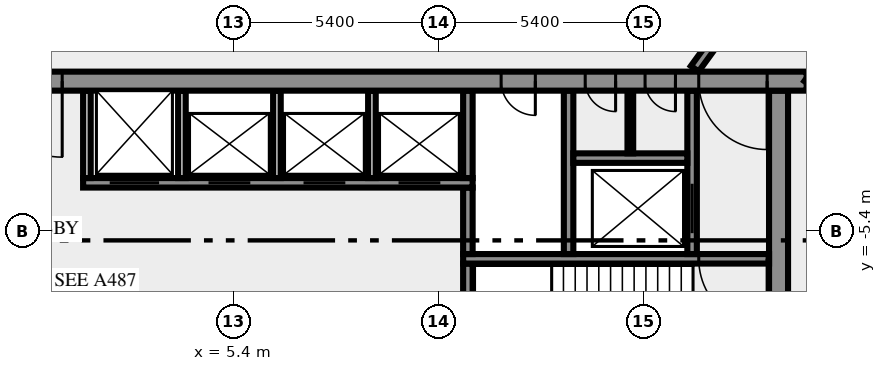
"""IFC4 building model, lengths in metres.
Left out: names, types, materials, properties, quantities, classifications, styles, units other than length and angle.
Written with IfcOpenShell. Run it as: python <this file> out.ifc"""

import sys

from ifc_helpers import new_model, si_unit, direction, frame, frame_2d, origin, place, context, subcontext, project, spatial, rectangle, extrude, element, fill, save


model = new_model("IFC4")
c1 = context("Model", 3, precision=1e-05, world=origin(), true_north=direction((0.0, 1.0)))
c2 = subcontext(c1, "Body", "Model", "MODEL_VIEW")
j1 = project(units=[si_unit("LENGTHUNIT", "METRE"), si_unit("PLANEANGLEUNIT", "RADIAN")], contexts=[c1])
p1 = place(None, origin())
s1 = spatial("IfcSite", under=j1, at=p1, CompositionType="ELEMENT")
p2 = place(p1, origin())
s2 = spatial("IfcBuilding", under=s1, at=p2, CompositionType="ELEMENT")
p3 = place(p2, frame((0.0, 0.0, 180.0)))
s3 = spatial("IfcBuildingStorey", under=s2, at=p3, CompositionType="ELEMENT", Elevation=180.0)
p4 = place(p3, frame((19.75, -10.5, 0.0), z_axis=(0.0, 0.0, 1.0), x_axis=(0.0, 1.0, 0.0)))
e1 = element("IfcWall", 1, at=p4, inside=s3, PredefinedType="SHEAR", context=c2, shape_type="SweptSolid", body=[
    extrude(rectangle(XDim=8.8, YDim=0.5, at=frame_2d((4.4, 0.0))), origin(), (0.0, 0.0, 1.0), 3.65),
])
p5 = place(p3, frame((11.575, -7.25, 0.0), z_axis=(0.0, 0.0, 1.0), x_axis=(0.0, 1.0, 0.0)))
e2 = element("IfcWall", 2, at=p5, inside=s3, PredefinedType="SHEAR", context=c2, shape_type="SweptSolid", body=[
    extrude(rectangle(XDim=1.0, YDim=0.25, at=frame_2d((0.5, 0.0))), origin(), (0.0, 0.0, 1.0), 3.65),
])
p6 = place(p3, frame((19.5, -6.125, 0.0), z_axis=(0.0, 0.0, 1.0), x_axis=(-1.0, 0.0, 0.0)))
e3 = element("IfcWall", 3, at=p6, inside=s3, PredefinedType="SHEAR", context=c2, shape_type="SweptSolid", body=[
    extrude(rectangle(XDim=8.05, YDim=0.25, at=frame_2d((4.025, 0.0))), origin(), (0.0, 0.0, 1.0), 3.65),
])
p7 = place(p6, frame((0.05, 0.0, 0.0)))
e4 = element("IfcOpeningElement", 4, at=p7, cuts=e3, PredefinedType="OPENING", context=c2, shape_type="SweptSolid", body=[
    extrude(rectangle(XDim=1.8, YDim=2.1, at=frame_2d((0.9, 1.05))), frame((0.0, 0.135, 0.0), z_axis=(0.0, -1.0, 0.0), x_axis=(1.0, 0.0, 0.0)), (0.0, 0.0, 1.0), 0.27),
])
p8 = place(p3, frame((11.575, -6.0, 0.0), z_axis=(0.0, 0.0, 1.0), x_axis=(0.0, 1.0, 0.0)))
e5 = element("IfcWall", 5, at=p8, inside=s3, PredefinedType="SHEAR", context=c2, shape_type="SweptSolid", body=[
    extrude(rectangle(XDim=1.75, YDim=0.25, at=frame_2d((0.875, 0.0))), origin(), (0.0, 0.0, 1.0), 3.65),
])
p9 = place(p3, frame((14.225, -6.0, 0.0), z_axis=(0.0, 0.0, 1.0), x_axis=(0.0, 1.0, 0.0)))
e6 = element("IfcWall", 6, at=p9, inside=s3, PredefinedType="SHEAR", context=c2, shape_type="SweptSolid", body=[
    extrude(rectangle(XDim=4.3, YDim=0.25, at=frame_2d((2.15, 0.0))), origin(), (0.0, 0.0, 1.0), 3.65),
])
p10 = place(p3, frame((17.475, -6.0, 0.0), z_axis=(0.0, 0.0, 1.0), x_axis=(0.0, 1.0, 0.0)))
e7 = element("IfcWall", 7, at=p10, inside=s3, PredefinedType="SHEAR", context=c2, shape_type="SweptSolid", body=[
    extrude(rectangle(XDim=4.3, YDim=0.25, at=frame_2d((2.15, 0.0))), origin(), (0.0, 0.0, 1.0), 3.65),
])
p11 = place(p10, frame((0.55, 0.0, 0.0)))
e8 = element("IfcOpeningElement", 8, at=p11, cuts=e7, PredefinedType="OPENING", context=c2, shape_type="SweptSolid", body=[
    extrude(rectangle(XDim=1.3, YDim=2.1, at=frame_2d((0.65, 1.05))), frame((0.0, 0.135, 0.0), z_axis=(0.0, -1.0, 0.0), x_axis=(1.0, 0.0, 0.0)), (0.0, 0.0, 1.0), 0.27),
])
p12 = place(p3, frame((1.45, -4.125, 0.0), z_axis=(0.0, 0.0, 1.0), x_axis=(1.0, 0.0, 0.0)))
e9 = element("IfcWall", 9, at=p12, inside=s3, PredefinedType="SHEAR", context=c2, shape_type="SweptSolid", body=[
    extrude(rectangle(XDim=10.25, YDim=0.25, at=frame_2d((5.125, 0.0))), origin(), (0.0, 0.0, 1.0), 3.65),
])
p13 = place(p12, frame((0.7, 0.0, 0.0)))
e10 = element("IfcOpeningElement", 10, at=p13, cuts=e9, PredefinedType="OPENING", context=c2, shape_type="SweptSolid", body=[
    extrude(rectangle(XDim=1.3, YDim=2.1, at=frame_2d((0.65, 1.05))), frame((0.0, 0.135, 0.0), z_axis=(0.0, -1.0, 0.0), x_axis=(1.0, 0.0, 0.0)), (0.0, 0.0, 1.0), 0.27),
])
p14 = place(p12, frame((3.3, 0.0, 0.0)))
e11 = element("IfcOpeningElement", 11, at=p14, cuts=e9, PredefinedType="OPENING", context=c2, shape_type="SweptSolid", body=[
    extrude(rectangle(XDim=1.1, YDim=2.1, at=frame_2d((0.55, 1.05))), frame((0.0, 0.135, 0.0), z_axis=(0.0, -1.0, 0.0), x_axis=(1.0, 0.0, 0.0)), (0.0, 0.0, 1.0), 0.27),
])
p15 = place(p12, frame((5.8, 0.0, 0.0)))
e12 = element("IfcOpeningElement", 12, at=p15, cuts=e9, PredefinedType="OPENING", context=c2, shape_type="SweptSolid", body=[
    extrude(rectangle(XDim=1.1, YDim=2.1, at=frame_2d((0.55, 1.05))), frame((0.0, 0.135, 0.0), z_axis=(0.0, -1.0, 0.0), x_axis=(1.0, 0.0, 0.0)), (0.0, 0.0, 1.0), 0.27),
])
p16 = place(p12, frame((8.3, 0.0, 0.0)))
e13 = element("IfcOpeningElement", 13, at=p16, cuts=e9, PredefinedType="OPENING", context=c2, shape_type="SweptSolid", body=[
    extrude(rectangle(XDim=1.1, YDim=2.1, at=frame_2d((0.55, 1.05))), frame((0.0, 0.135, 0.0), z_axis=(0.0, -1.0, 0.0), x_axis=(1.0, 0.0, 0.0)), (0.0, 0.0, 1.0), 0.27),
])
for number, where, z_axis, x_axis in (
    (14, (1.55, -4.0, 0.0), (0.0, 0.0, 1.0), (0.0, 1.0, 0.0)),
    (15, (4.05, -4.0, 0.0), (0.0, 0.0, 1.0), (0.0, 1.0, 0.0)),
    (16, (6.55, -4.0, 0.0), (0.0, 0.0, 1.0), (0.0, 1.0, 0.0)),
    (17, (9.05, -4.0, 0.0), (0.0, 0.0, 1.0), (0.0, 1.0, 0.0)),
):
    element("IfcWall", number, at=place(p3, frame(where, z_axis=z_axis, x_axis=x_axis)), inside=s3, PredefinedType="SOLIDWALL", context=c2, shape_type="SweptSolid", body=[
        extrude(rectangle(XDim=2.3, YDim=0.2, at=frame_2d((1.15, 0.0))), origin(), (0.0, 0.0, 1.0), 3.65),
    ])
p17 = place(p3, frame((11.575, -4.0, 0.0), z_axis=(0.0, 0.0, 1.0), x_axis=(0.0, 1.0, 0.0)))
e18 = element("IfcWall", 18, at=p17, inside=s3, PredefinedType="SHEAR", context=c2, shape_type="SweptSolid", body=[
    extrude(rectangle(XDim=2.3, YDim=0.25, at=frame_2d((1.15, 0.0))), origin(), (0.0, 0.0, 1.0), 3.65),
])
p18 = place(p3, frame((14.35, -3.475, 0.0), z_axis=(0.0, 0.0, 1.0), x_axis=(1.0, 0.0, 0.0)))
e19 = element("IfcWall", 19, at=p18, inside=s3, PredefinedType="SHEAR", context=c2, shape_type="SweptSolid", body=[
    extrude(rectangle(XDim=3.0, YDim=0.25, at=frame_2d((1.5, 0.0))), origin(), (0.0, 0.0, 1.0), 3.65),
])
p19 = place(p3, frame((15.85, -3.35, 0.0), z_axis=(0.0, 0.0, 1.0), x_axis=(0.0, 1.0, 0.0)))
e20 = element("IfcWall", 20, at=p19, inside=s3, PredefinedType="PARTITIONING", context=c2, shape_type="SweptSolid", body=[
    extrude(rectangle(XDim=1.65, YDim=0.15, at=frame_2d((0.825, 0.0))), origin(), (0.0, 0.0, 1.0), 3.65),
])
p20 = place(p3, frame((20.49, -1.45, 0.0), z_axis=(0.0, 0.0, 1.0), x_axis=(-1.0, 0.0, 0.0)))
e21 = element("IfcWall", 21, at=p20, inside=s3, PredefinedType="SHEAR", context=c2, shape_type="SweptSolid", body=[
    extrude(rectangle(XDim=40.98, YDim=0.5, at=frame_2d((20.49, 0.0))), origin(), (0.0, 0.0, 1.0), 3.65),
])
p21 = place(p20, frame((38.14, 0.0, 0.0)))
e22 = element("IfcOpeningElement", 22, at=p21, cuts=e21, PredefinedType="OPENING", context=c2, shape_type="SweptSolid", body=[
    extrude(rectangle(XDim=1.8, YDim=2.1, at=frame_2d((0.9, 1.05))), frame((0.0, 0.26, 0.0), z_axis=(0.0, -1.0, 0.0), x_axis=(1.0, 0.0, 0.0)), (0.0, 0.0, 1.0), 0.52),
])
p22 = place(p20, frame((35.89, 0.0, 0.0)))
e23 = element("IfcOpeningElement", 23, at=p22, cuts=e21, PredefinedType="OPENING", context=c2, shape_type="SweptSolid", body=[
    extrude(rectangle(XDim=0.9, YDim=2.1, at=frame_2d((0.45, 1.05))), frame((0.0, 0.26, 0.0), z_axis=(0.0, -1.0, 0.0), x_axis=(1.0, 0.0, 0.0)), (0.0, 0.0, 1.0), 0.52),
])
p23 = place(p20, frame((32.94, 0.0, 0.0)))
e24 = element("IfcOpeningElement", 24, at=p23, cuts=e21, PredefinedType="OPENING", context=c2, shape_type="SweptSolid", body=[
    extrude(rectangle(XDim=0.9, YDim=2.1, at=frame_2d((0.45, 1.05))), frame((0.0, 0.26, 0.0), z_axis=(0.0, -1.0, 0.0), x_axis=(1.0, 0.0, 0.0)), (0.0, 0.0, 1.0), 0.52),
])
p24 = place(p20, frame((30.802, 0.0, 0.0)))
e25 = element("IfcOpeningElement", 25, at=p24, cuts=e21, PredefinedType="OPENING", context=c2, shape_type="SweptSolid", body=[
    extrude(rectangle(XDim=0.9, YDim=2.1, at=frame_2d((0.45, 1.05))), frame((0.0, 0.26, 0.0), z_axis=(0.0, -1.0, 0.0), x_axis=(1.0, 0.0, 0.0)), (0.0, 0.0, 1.0), 0.52),
])
p25 = place(p20, frame((29.24, 0.0, 0.0)))
e26 = element("IfcOpeningElement", 26, at=p25, cuts=e21, PredefinedType="OPENING", context=c2, shape_type="SweptSolid", body=[
    extrude(rectangle(XDim=0.9, YDim=2.1, at=frame_2d((0.45, 1.05))), frame((0.0, 0.26, 0.0), z_axis=(0.0, -1.0, 0.0), x_axis=(1.0, 0.0, 0.0)), (0.0, 0.0, 1.0), 0.52),
])
p26 = place(p20, frame((27.39, 0.0, 0.0)))
e27 = element("IfcOpeningElement", 27, at=p26, cuts=e21, PredefinedType="OPENING", context=c2, shape_type="SweptSolid", body=[
    extrude(rectangle(XDim=0.9, YDim=2.1, at=frame_2d((0.45, 1.05))), frame((0.0, 0.26, 0.0), z_axis=(0.0, -1.0, 0.0), x_axis=(1.0, 0.0, 0.0)), (0.0, 0.0, 1.0), 0.52),
])
p27 = place(p20, frame((25.228, 0.0, 0.0)))
e28 = element("IfcOpeningElement", 28, at=p27, cuts=e21, PredefinedType="OPENING", context=c2, shape_type="SweptSolid", body=[
    extrude(rectangle(XDim=0.9, YDim=2.1, at=frame_2d((0.45, 1.05))), frame((0.0, 0.26, 0.0), z_axis=(0.0, -1.0, 0.0), x_axis=(1.0, 0.0, 0.0)), (0.0, 0.0, 1.0), 0.52),
])
p28 = place(p20, frame((19.59, 0.0, 0.0)))
e29 = element("IfcOpeningElement", 29, at=p28, cuts=e21, PredefinedType="OPENING", context=c2, shape_type="SweptSolid", body=[
    extrude(rectangle(XDim=2.0, YDim=2.1, at=frame_2d((1.0, 1.05))), frame((0.0, 0.26, 0.0), z_axis=(0.0, -1.0, 0.0), x_axis=(1.0, 0.0, 0.0)), (0.0, 0.0, 1.0), 0.52),
])
p29 = place(p20, frame((7.14, 0.0, 0.0)))
e30 = element("IfcOpeningElement", 30, at=p29, cuts=e21, PredefinedType="OPENING", context=c2, shape_type="SweptSolid", body=[
    extrude(rectangle(XDim=0.9, YDim=2.1, at=frame_2d((0.45, 1.05))), frame((0.0, 0.26, 0.0), z_axis=(0.0, -1.0, 0.0), x_axis=(1.0, 0.0, 0.0)), (0.0, 0.0, 1.0), 0.52),
])
p30 = place(p20, frame((5.028, 0.0, 0.0)))
e31 = element("IfcOpeningElement", 31, at=p30, cuts=e21, PredefinedType="OPENING", context=c2, shape_type="SweptSolid", body=[
    extrude(rectangle(XDim=0.8, YDim=2.1, at=frame_2d((0.4, 1.05))), frame((0.0, 0.26, 0.0), z_axis=(0.0, -1.0, 0.0), x_axis=(1.0, 0.0, 0.0)), (0.0, 0.0, 1.0), 0.52),
])
p31 = place(p20, frame((3.452, 0.0, 0.0)))
e32 = element("IfcOpeningElement", 32, at=p31, cuts=e21, PredefinedType="OPENING", context=c2, shape_type="SweptSolid", body=[
    extrude(rectangle(XDim=0.8, YDim=2.1, at=frame_2d((0.4, 1.05))), frame((0.0, 0.26, 0.0), z_axis=(0.0, -1.0, 0.0), x_axis=(1.0, 0.0, 0.0)), (0.0, 0.0, 1.0), 0.52),
])
p32 = place(p20, frame((1.04, 0.0, 0.0)))
e33 = element("IfcOpeningElement", 33, at=p32, cuts=e21, PredefinedType="OPENING", context=c2, shape_type="SweptSolid", body=[
    extrude(rectangle(XDim=1.8, YDim=2.1, at=frame_2d((0.9, 1.05))), frame((0.0, 0.26, 0.0), z_axis=(0.0, -1.0, 0.0), x_axis=(1.0, 0.0, 0.0)), (0.0, 0.0, 1.0), 0.52),
])
p33 = place(p3, frame((17.545, -1.125, 0.0), z_axis=(0.0, 0.0, 1.0), x_axis=(0.587791430994, 0.80901250525, 0.0)))
e34 = element("IfcWall", 34, at=p33, inside=s3, PredefinedType="SOLIDWALL", context=c2, shape_type="SweptSolid", body=[
    extrude(rectangle(XDim=24.703, YDim=0.25, at=frame_2d((12.352, 0.0))), origin(), (0.0, 0.0, 1.0), 3.65),
])
p34 = place(p33, frame((23.329, 0.0, 0.0)))
e35 = element("IfcOpeningElement", 35, at=p34, cuts=e34, PredefinedType="OPENING", context=c2, shape_type="SweptSolid", body=[
    extrude(rectangle(XDim=0.9, YDim=2.1, at=frame_2d((0.45, 1.05))), frame((0.0, 0.135, 0.0), z_axis=(0.0, -1.0, 0.0), x_axis=(1.0, 0.0, 0.0)), (0.0, 0.0, 1.0), 0.27),
])
p35 = place(p33, frame((3.442, 0.0, 0.0)))
e36 = element("IfcOpeningElement", 36, at=p35, cuts=e34, PredefinedType="OPENING", context=c2, shape_type="SweptSolid", body=[
    extrude(rectangle(XDim=1.2, YDim=2.1, at=frame_2d((0.6, 1.05))), frame((0.0, 0.135, 0.0), z_axis=(0.0, -1.0, 0.0), x_axis=(1.0, 0.0, 0.0)), (0.0, 0.0, 1.0), 0.27),
])
p36 = place(p3, frame((34.062, 17.101, 0.0), z_axis=(0.0, 0.0, 1.0), x_axis=(-0.58778129431, -0.809019870003, 0.0)))
e37 = element("IfcWall", 37, at=p36, inside=s3, PredefinedType="SOLIDWALL", context=c2, shape_type="SweptSolid", body=[
    extrude(rectangle(XDim=23.021, YDim=0.25, at=frame_2d((11.51, 0.0))), origin(), (0.0, 0.0, 1.0), 3.65),
])
p37 = place(p36, frame((20.737, 0.0, 0.0)))
e38 = element("IfcOpeningElement", 38, at=p37, cuts=e37, PredefinedType="OPENING", context=c2, shape_type="SweptSolid", body=[
    extrude(rectangle(XDim=1.8, YDim=2.1, at=frame_2d((0.9, 1.05))), frame((0.0, 0.135, 0.0), z_axis=(0.0, -1.0, 0.0), x_axis=(1.0, 0.0, 0.0)), (0.0, 0.0, 1.0), 0.27),
])
p38 = place(p36, frame((0.174, 0.0, 0.0)))
e39 = element("IfcOpeningElement", 39, at=p38, cuts=e37, PredefinedType="OPENING", context=c2, shape_type="SweptSolid", body=[
    extrude(rectangle(XDim=1.8, YDim=2.1, at=frame_2d((0.9, 1.05))), frame((0.0, 0.135, 0.0), z_axis=(0.0, -1.0, 0.0), x_axis=(1.0, 0.0, 0.0)), (0.0, 0.0, 1.0), 0.27),
])
p39 = place(p7, origin())
e40 = element("IfcDoor", 40, at=p39, inside=s3, OperationType="DOUBLE_DOOR_SINGLE_SWING", PredefinedType="DOOR", context=c2, shape_type="SweptSolid", body=[
    extrude(rectangle(XDim=1.8, YDim=2.1, at=frame_2d((0.9, 1.05))), frame((0.0, 0.025, 0.0), z_axis=(0.0, -1.0, 0.0), x_axis=(1.0, 0.0, 0.0)), (0.0, 0.0, 1.0), 0.05),
])
fill(e4, e40)
p40 = place(p11, origin())
e41 = element("IfcDoor", 41, at=p40, inside=s3, OperationType="DOUBLE_DOOR_SLIDING", PredefinedType="DOOR", context=c2, shape_type="SweptSolid", body=[
    extrude(rectangle(XDim=1.3, YDim=2.1, at=frame_2d((0.65, 1.05))), frame((0.0, 0.025, 0.0), z_axis=(0.0, -1.0, 0.0), x_axis=(1.0, 0.0, 0.0)), (0.0, 0.0, 1.0), 0.05),
])
fill(e8, e41)
p41 = place(p13, origin())
e42 = element("IfcDoor", 42, at=p41, inside=s3, OperationType="DOUBLE_DOOR_SLIDING", PredefinedType="DOOR", context=c2, shape_type="SweptSolid", body=[
    extrude(rectangle(XDim=1.3, YDim=2.1, at=frame_2d((0.65, 1.05))), frame((0.0, 0.025, 0.0), z_axis=(0.0, -1.0, 0.0), x_axis=(1.0, 0.0, 0.0)), (0.0, 0.0, 1.0), 0.05),
])
fill(e10, e42)
p42 = place(p14, origin())
e43 = element("IfcDoor", 43, at=p42, inside=s3, OperationType="DOUBLE_DOOR_SLIDING", PredefinedType="DOOR", context=c2, shape_type="SweptSolid", body=[
    extrude(rectangle(XDim=1.1, YDim=2.1, at=frame_2d((0.55, 1.05))), frame((0.0, 0.025, 0.0), z_axis=(0.0, -1.0, 0.0), x_axis=(1.0, 0.0, 0.0)), (0.0, 0.0, 1.0), 0.05),
])
fill(e11, e43)
p43 = place(p15, origin())
e44 = element("IfcDoor", 44, at=p43, inside=s3, OperationType="DOUBLE_DOOR_SLIDING", PredefinedType="DOOR", context=c2, shape_type="SweptSolid", body=[
    extrude(rectangle(XDim=1.1, YDim=2.1, at=frame_2d((0.55, 1.05))), frame((0.0, 0.025, 0.0), z_axis=(0.0, -1.0, 0.0), x_axis=(1.0, 0.0, 0.0)), (0.0, 0.0, 1.0), 0.05),
])
fill(e12, e44)
p44 = place(p16, origin())
e45 = element("IfcDoor", 45, at=p44, inside=s3, OperationType="DOUBLE_DOOR_SLIDING", PredefinedType="DOOR", context=c2, shape_type="SweptSolid", body=[
    extrude(rectangle(XDim=1.1, YDim=2.1, at=frame_2d((0.55, 1.05))), frame((0.0, 0.025, 0.0), z_axis=(0.0, -1.0, 0.0), x_axis=(1.0, 0.0, 0.0)), (0.0, 0.0, 1.0), 0.05),
])
fill(e13, e45)
p45 = place(p28, origin())
e46 = element("IfcDoor", 46, at=p45, inside=s3, OperationType="DOUBLE_DOOR_SINGLE_SWING", PredefinedType="DOOR", context=c2, shape_type="SweptSolid", body=[
    extrude(rectangle(XDim=2.0, YDim=2.1, at=frame_2d((1.0, 1.05))), frame((0.0, 0.025, 0.0), z_axis=(0.0, -1.0, 0.0), x_axis=(1.0, 0.0, 0.0)), (0.0, 0.0, 1.0), 0.05),
])
fill(e29, e46)
p46 = place(p29, origin())
e47 = element("IfcDoor", 47, at=p46, inside=s3, OperationType="SINGLE_SWING_LEFT", PredefinedType="DOOR", context=c2, shape_type="SweptSolid", body=[
    extrude(rectangle(XDim=0.9, YDim=2.1, at=frame_2d((0.45, 1.05))), frame((0.0, 0.025, 0.0), z_axis=(0.0, -1.0, 0.0), x_axis=(1.0, 0.0, 0.0)), (0.0, 0.0, 1.0), 0.05),
])
fill(e30, e47)
p47 = place(p30, origin())
e48 = element("IfcDoor", 48, at=p47, inside=s3, OperationType="SINGLE_SWING_LEFT", PredefinedType="DOOR", context=c2, shape_type="SweptSolid", body=[
    extrude(rectangle(XDim=0.8, YDim=2.1, at=frame_2d((0.4, 1.05))), frame((0.0, 0.025, 0.0), z_axis=(0.0, -1.0, 0.0), x_axis=(1.0, 0.0, 0.0)), (0.0, 0.0, 1.0), 0.05),
])
fill(e31, e48)
p48 = place(p31, origin())
e49 = element("IfcDoor", 49, at=p48, inside=s3, OperationType="SINGLE_SWING_LEFT", PredefinedType="DOOR", context=c2, shape_type="SweptSolid", body=[
    extrude(rectangle(XDim=0.8, YDim=2.1, at=frame_2d((0.4, 1.05))), frame((0.0, 0.025, 0.0), z_axis=(0.0, -1.0, 0.0), x_axis=(1.0, 0.0, 0.0)), (0.0, 0.0, 1.0), 0.05),
])
fill(e32, e49)
p49 = place(p32, origin())
e50 = element("IfcDoor", 50, at=p49, inside=s3, OperationType="DOUBLE_DOOR_SINGLE_SWING", PredefinedType="DOOR", context=c2, shape_type="SweptSolid", body=[
    extrude(rectangle(XDim=1.8, YDim=2.1, at=frame_2d((0.9, 1.05))), frame((0.0, 0.025, 0.0), z_axis=(0.0, -1.0, 0.0), x_axis=(1.0, 0.0, 0.0)), (0.0, 0.0, 1.0), 0.05),
])
fill(e33, e50)
save(model, sys.argv[1])
